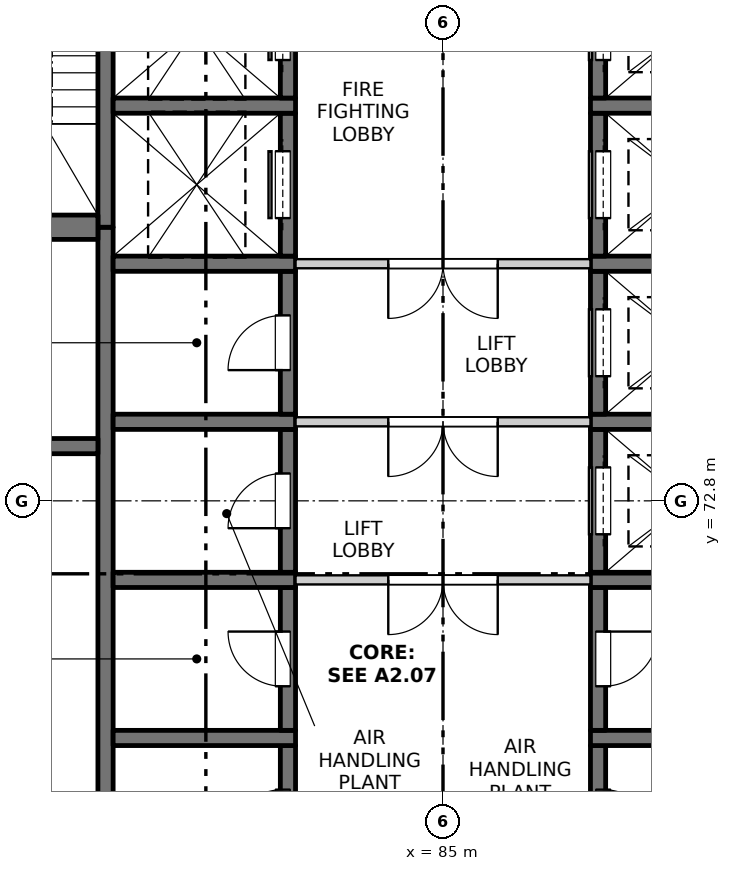
"""IFC4 building model, lengths in metres.
Left out: names, types, materials, properties, quantities, classifications, styles, units other than length and angle.
Written with IfcOpenShell. Run it as: python <this file> out.ifc"""

import sys

from ifc_helpers import new_model, si_unit, direction, frame, frame_2d, origin, place, context, subcontext, project, spatial, rectangle, extrude, element, fill, save


model = new_model("IFC4")
c1 = context("Model", 3, precision=1e-05, world=origin(), true_north=direction((0.0, 1.0)))
c2 = subcontext(c1, "Body", "Model", "MODEL_VIEW")
j1 = project(units=[si_unit("LENGTHUNIT", "METRE"), si_unit("PLANEANGLEUNIT", "RADIAN")], contexts=[c1])
p1 = place(None, origin())
s1 = spatial("IfcSite", under=j1, at=p1, CompositionType="ELEMENT")
p2 = place(p1, origin())
s2 = spatial("IfcBuilding", under=s1, at=p2, CompositionType="ELEMENT")
p3 = place(p2, frame((0.0, 0.0, 241.5)))
s3 = spatial("IfcBuildingStorey", under=s2, at=p3, CompositionType="ELEMENT", Elevation=241.5)
p4 = place(p3, frame((79.45, 60.975, -0.3), z_axis=(0.0, 0.0, 1.0), x_axis=(0.0, 1.0, 0.0)))
e1 = element("IfcWall", 1, at=p4, inside=s3, PredefinedType="SOLIDWALL", context=c2, shape_type="SweptSolid", body=[
    extrude(rectangle(XDim=16.325, YDim=0.25, at=frame_2d((8.163, 0.0))), origin(), (0.0, 0.0, 1.0), 4.5),
])
p5 = place(p3, frame((79.45, 77.3, -0.3), z_axis=(0.0, 0.0, 1.0), x_axis=(0.0, 1.0, 0.0)))
e2 = element("IfcWall", 2, at=p5, inside=s3, PredefinedType="SOLIDWALL", context=c2, shape_type="SweptSolid", body=[
    extrude(rectangle(XDim=7.0, YDim=0.25, at=frame_2d((3.5, 0.0))), origin(), (0.0, 0.0, 1.0), 4.5),
])
p6 = place(p3, frame((82.45, 66.425, -0.3), z_axis=(0.0, 0.0, 1.0), x_axis=(0.0, 1.0, 0.0)))
e3 = element("IfcWall", 3, at=p6, inside=s3, PredefinedType="SOLIDWALL", context=c2, shape_type="SweptSolid", body=[
    extrude(rectangle(XDim=2.35, YDim=0.25, at=frame_2d((1.175, 0.0))), origin(), (0.0, 0.0, 1.0), 4.5),
])
p7 = place(p6, frame((0.725, 0.0, 0.3)))
e4 = element("IfcOpeningElement", 4, at=p7, cuts=e3, PredefinedType="OPENING", context=c2, shape_type="SweptSolid", body=[
    extrude(rectangle(XDim=0.9, YDim=2.1, at=frame_2d((0.45, 1.05))), frame((0.0, 0.135, 0.0), z_axis=(0.0, -1.0, 0.0), x_axis=(1.0, 0.0, 0.0)), (0.0, 0.0, 1.0), 0.27),
])
p8 = place(p3, frame((79.575, 68.9, -0.3), z_axis=(0.0, 0.0, 1.0), x_axis=(1.0, 0.0, 0.0)))
e5 = element("IfcWall", 5, at=p8, inside=s3, PredefinedType="SOLIDWALL", context=c2, shape_type="SweptSolid", body=[
    extrude(rectangle(XDim=3.0, YDim=0.25, at=frame_2d((1.5, 0.0))), origin(), (0.0, 0.0, 1.0), 4.5),
])
p9 = place(p3, frame((82.45, 69.025, -0.3), z_axis=(0.0, 0.0, 1.0), x_axis=(0.0, 1.0, 0.0)))
e6 = element("IfcWall", 6, at=p9, inside=s3, PredefinedType="SOLIDWALL", context=c2, shape_type="SweptSolid", body=[
    extrude(rectangle(XDim=2.35, YDim=0.25, at=frame_2d((1.175, 0.0))), origin(), (0.0, 0.0, 1.0), 4.5),
])
p10 = place(p9, frame((0.725, 0.0, 0.3)))
e7 = element("IfcOpeningElement", 7, at=p10, cuts=e6, PredefinedType="OPENING", context=c2, shape_type="SweptSolid", body=[
    extrude(rectangle(XDim=0.9, YDim=2.1, at=frame_2d((0.45, 1.05))), frame((0.0, 0.135, 0.0), z_axis=(0.0, -1.0, 0.0), x_axis=(1.0, 0.0, 0.0)), (0.0, 0.0, 1.0), 0.27),
])
p11 = place(p3, frame((79.575, 71.5, -0.3), z_axis=(0.0, 0.0, 1.0), x_axis=(1.0, 0.0, 0.0)))
e8 = element("IfcWall", 8, at=p11, inside=s3, PredefinedType="SOLIDWALL", context=c2, shape_type="SweptSolid", body=[
    extrude(rectangle(XDim=3.0, YDim=0.25, at=frame_2d((1.5, 0.0))), origin(), (0.0, 0.0, 1.0), 4.5),
])
p12 = place(p3, frame((82.45, 71.625, -0.3), z_axis=(0.0, 0.0, 1.0), x_axis=(0.0, 1.0, 0.0)))
e9 = element("IfcWall", 9, at=p12, inside=s3, PredefinedType="SOLIDWALL", context=c2, shape_type="SweptSolid", body=[
    extrude(rectangle(XDim=2.35, YDim=0.25, at=frame_2d((1.175, 0.0))), origin(), (0.0, 0.0, 1.0), 4.5),
])
p13 = place(p12, frame((0.725, 0.0, 0.3)))
e10 = element("IfcOpeningElement", 10, at=p13, cuts=e9, PredefinedType="OPENING", context=c2, shape_type="SweptSolid", body=[
    extrude(rectangle(XDim=0.9, YDim=2.1, at=frame_2d((0.45, 1.05))), frame((0.0, 0.135, 0.0), z_axis=(0.0, -1.0, 0.0), x_axis=(1.0, 0.0, 0.0)), (0.0, 0.0, 1.0), 0.27),
])
p14 = place(p3, frame((79.575, 74.1, -0.3), z_axis=(0.0, 0.0, 1.0), x_axis=(1.0, 0.0, 0.0)))
e11 = element("IfcWall", 11, at=p14, inside=s3, PredefinedType="SOLIDWALL", context=c2, shape_type="SweptSolid", body=[
    extrude(rectangle(XDim=3.0, YDim=0.25, at=frame_2d((1.5, 0.0))), origin(), (0.0, 0.0, 1.0), 4.5),
])
p15 = place(p3, frame((82.45, 74.225, -0.3), z_axis=(0.0, 0.0, 1.0), x_axis=(0.0, 1.0, 0.0)))
e12 = element("IfcWall", 12, at=p15, inside=s3, PredefinedType="SOLIDWALL", context=c2, shape_type="SweptSolid", body=[
    extrude(rectangle(XDim=2.35, YDim=0.25, at=frame_2d((1.175, 0.0))), origin(), (0.0, 0.0, 1.0), 4.5),
])
p16 = place(p15, frame((0.725, 0.0, 0.3)))
e13 = element("IfcOpeningElement", 13, at=p16, cuts=e12, PredefinedType="OPENING", context=c2, shape_type="SweptSolid", body=[
    extrude(rectangle(XDim=0.9, YDim=2.1, at=frame_2d((0.45, 1.05))), frame((0.0, 0.135, 0.0), z_axis=(0.0, -1.0, 0.0), x_axis=(1.0, 0.0, 0.0)), (0.0, 0.0, 1.0), 0.27),
])
p17 = place(p3, frame((79.575, 76.7, -0.3), z_axis=(0.0, 0.0, 1.0), x_axis=(1.0, 0.0, 0.0)))
e14 = element("IfcWall", 14, at=p17, inside=s3, PredefinedType="SOLIDWALL", context=c2, shape_type="SweptSolid", body=[
    extrude(rectangle(XDim=3.0, YDim=0.25, at=frame_2d((1.5, 0.0))), origin(), (0.0, 0.0, 1.0), 4.5),
])
p18 = place(p3, frame((82.45, 76.825, -0.3), z_axis=(0.0, 0.0, 1.0), x_axis=(0.0, 1.0, 0.0)))
e15 = element("IfcWall", 15, at=p18, inside=s3, PredefinedType="SOLIDWALL", context=c2, shape_type="SweptSolid", body=[
    extrude(rectangle(XDim=2.35, YDim=0.25, at=frame_2d((1.175, 0.0))), origin(), (0.0, 0.0, 1.0), 4.5),
])
p19 = place(p18, frame((0.625, 0.0, 0.3)))
e16 = element("IfcOpeningElement", 16, at=p19, cuts=e15, PredefinedType="OPENING", context=c2, shape_type="SweptSolid", body=[
    extrude(rectangle(XDim=1.1, YDim=2.1, at=frame_2d((0.55, 1.05))), frame((0.0, 0.135, 0.0), z_axis=(0.0, -1.0, 0.0), x_axis=(1.0, 0.0, 0.0)), (0.0, 0.0, 1.0), 0.27),
])
p20 = place(p3, frame((79.575, 79.3, -0.3), z_axis=(0.0, 0.0, 1.0), x_axis=(1.0, 0.0, 0.0)))
e17 = element("IfcWall", 17, at=p20, inside=s3, PredefinedType="SOLIDWALL", context=c2, shape_type="SweptSolid", body=[
    extrude(rectangle(XDim=3.0, YDim=0.25, at=frame_2d((1.5, 0.0))), origin(), (0.0, 0.0, 1.0), 4.5),
])
p21 = place(p3, frame((82.45, 79.425, -0.3), z_axis=(0.0, 0.0, 1.0), x_axis=(0.0, 1.0, 0.0)))
e18 = element("IfcWall", 18, at=p21, inside=s3, PredefinedType="SOLIDWALL", context=c2, shape_type="SweptSolid", body=[
    extrude(rectangle(XDim=2.35, YDim=0.25, at=frame_2d((1.175, 0.0))), origin(), (0.0, 0.0, 1.0), 4.5),
])
p22 = place(p21, frame((0.625, 0.0, 0.3)))
e19 = element("IfcOpeningElement", 19, at=p22, cuts=e18, PredefinedType="OPENING", context=c2, shape_type="SweptSolid", body=[
    extrude(rectangle(XDim=1.1, YDim=2.1, at=frame_2d((0.55, 1.05))), frame((0.0, 0.135, 0.0), z_axis=(0.0, -1.0, 0.0), x_axis=(1.0, 0.0, 0.0)), (0.0, 0.0, 1.0), 0.27),
])
p23 = place(p3, frame((87.55, 66.425, -0.3), z_axis=(0.0, 0.0, 1.0), x_axis=(0.0, 1.0, 0.0)))
e20 = element("IfcWall", 20, at=p23, inside=s3, PredefinedType="SOLIDWALL", context=c2, shape_type="SweptSolid", body=[
    extrude(rectangle(XDim=2.35, YDim=0.25, at=frame_2d((1.175, 0.0))), origin(), (0.0, 0.0, 1.0), 4.5),
])
p24 = place(p23, frame((0.725, 0.0, 0.3)))
e21 = element("IfcOpeningElement", 21, at=p24, cuts=e20, PredefinedType="OPENING", context=c2, shape_type="SweptSolid", body=[
    extrude(rectangle(XDim=0.9, YDim=2.1, at=frame_2d((0.45, 1.05))), frame((0.0, 0.135, 0.0), z_axis=(0.0, -1.0, 0.0), x_axis=(1.0, 0.0, 0.0)), (0.0, 0.0, 1.0), 0.27),
])
p25 = place(p3, frame((87.425, 68.9, -0.3), z_axis=(0.0, 0.0, 1.0), x_axis=(1.0, 0.0, 0.0)))
e22 = element("IfcWall", 22, at=p25, inside=s3, PredefinedType="SOLIDWALL", context=c2, shape_type="SweptSolid", body=[
    extrude(rectangle(XDim=3.0, YDim=0.25, at=frame_2d((1.5, 0.0))), origin(), (0.0, 0.0, 1.0), 4.5),
])
p26 = place(p3, frame((87.55, 69.025, -0.3), z_axis=(0.0, 0.0, 1.0), x_axis=(0.0, 1.0, 0.0)))
e23 = element("IfcWall", 23, at=p26, inside=s3, PredefinedType="SOLIDWALL", context=c2, shape_type="SweptSolid", body=[
    extrude(rectangle(XDim=2.35, YDim=0.25, at=frame_2d((1.175, 0.0))), origin(), (0.0, 0.0, 1.0), 4.5),
])
p27 = place(p26, frame((0.725, 0.0, 0.3)))
e24 = element("IfcOpeningElement", 24, at=p27, cuts=e23, PredefinedType="OPENING", context=c2, shape_type="SweptSolid", body=[
    extrude(rectangle(XDim=0.9, YDim=2.1, at=frame_2d((0.45, 1.05))), frame((0.0, 0.135, 0.0), z_axis=(0.0, -1.0, 0.0), x_axis=(1.0, 0.0, 0.0)), (0.0, 0.0, 1.0), 0.27),
])
p28 = place(p3, frame((87.425, 71.5, -0.3), z_axis=(0.0, 0.0, 1.0), x_axis=(1.0, 0.0, 0.0)))
e25 = element("IfcWall", 25, at=p28, inside=s3, PredefinedType="SOLIDWALL", context=c2, shape_type="SweptSolid", body=[
    extrude(rectangle(XDim=3.0, YDim=0.25, at=frame_2d((1.5, 0.0))), origin(), (0.0, 0.0, 1.0), 4.5),
])
p29 = place(p3, frame((87.55, 71.625, -0.3), z_axis=(0.0, 0.0, 1.0), x_axis=(0.0, 1.0, 0.0)))
e26 = element("IfcWall", 26, at=p29, inside=s3, PredefinedType="SOLIDWALL", context=c2, shape_type="SweptSolid", body=[
    extrude(rectangle(XDim=2.35, YDim=0.25, at=frame_2d((1.175, 0.0))), origin(), (0.0, 0.0, 1.0), 4.5),
])
p30 = place(p29, frame((0.625, 0.0, 0.3)))
e27 = element("IfcOpeningElement", 27, at=p30, cuts=e26, PredefinedType="OPENING", context=c2, shape_type="SweptSolid", body=[
    extrude(rectangle(XDim=1.1, YDim=2.1, at=frame_2d((0.55, 1.05))), frame((0.0, 0.135, 0.0), z_axis=(0.0, -1.0, 0.0), x_axis=(1.0, 0.0, 0.0)), (0.0, 0.0, 1.0), 0.27),
])
p31 = place(p3, frame((87.425, 74.1, -0.3), z_axis=(0.0, 0.0, 1.0), x_axis=(1.0, 0.0, 0.0)))
e28 = element("IfcWall", 28, at=p31, inside=s3, PredefinedType="SOLIDWALL", context=c2, shape_type="SweptSolid", body=[
    extrude(rectangle(XDim=3.0, YDim=0.25, at=frame_2d((1.5, 0.0))), origin(), (0.0, 0.0, 1.0), 4.5),
])
p32 = place(p3, frame((87.55, 74.225, -0.3), z_axis=(0.0, 0.0, 1.0), x_axis=(0.0, 1.0, 0.0)))
e29 = element("IfcWall", 29, at=p32, inside=s3, PredefinedType="SOLIDWALL", context=c2, shape_type="SweptSolid", body=[
    extrude(rectangle(XDim=2.35, YDim=0.25, at=frame_2d((1.175, 0.0))), origin(), (0.0, 0.0, 1.0), 4.5),
])
p33 = place(p32, frame((0.625, 0.0, 0.3)))
e30 = element("IfcOpeningElement", 30, at=p33, cuts=e29, PredefinedType="OPENING", context=c2, shape_type="SweptSolid", body=[
    extrude(rectangle(XDim=1.1, YDim=2.1, at=frame_2d((0.55, 1.05))), frame((0.0, 0.135, 0.0), z_axis=(0.0, -1.0, 0.0), x_axis=(1.0, 0.0, 0.0)), (0.0, 0.0, 1.0), 0.27),
])
p34 = place(p3, frame((87.425, 76.7, -0.3), z_axis=(0.0, 0.0, 1.0), x_axis=(1.0, 0.0, 0.0)))
e31 = element("IfcWall", 31, at=p34, inside=s3, PredefinedType="SOLIDWALL", context=c2, shape_type="SweptSolid", body=[
    extrude(rectangle(XDim=3.0, YDim=0.25, at=frame_2d((1.5, 0.0))), origin(), (0.0, 0.0, 1.0), 4.5),
])
p35 = place(p3, frame((87.55, 76.825, -0.3), z_axis=(0.0, 0.0, 1.0), x_axis=(0.0, 1.0, 0.0)))
e32 = element("IfcWall", 32, at=p35, inside=s3, PredefinedType="SOLIDWALL", context=c2, shape_type="SweptSolid", body=[
    extrude(rectangle(XDim=2.35, YDim=0.25, at=frame_2d((1.175, 0.0))), origin(), (0.0, 0.0, 1.0), 4.5),
])
p36 = place(p35, frame((0.625, 0.0, 0.3)))
e33 = element("IfcOpeningElement", 33, at=p36, cuts=e32, PredefinedType="OPENING", context=c2, shape_type="SweptSolid", body=[
    extrude(rectangle(XDim=1.1, YDim=2.1, at=frame_2d((0.55, 1.05))), frame((0.0, 0.135, 0.0), z_axis=(0.0, -1.0, 0.0), x_axis=(1.0, 0.0, 0.0)), (0.0, 0.0, 1.0), 0.27),
])
p37 = place(p3, frame((87.425, 79.3, -0.3), z_axis=(0.0, 0.0, 1.0), x_axis=(1.0, 0.0, 0.0)))
e34 = element("IfcWall", 34, at=p37, inside=s3, PredefinedType="SOLIDWALL", context=c2, shape_type="SweptSolid", body=[
    extrude(rectangle(XDim=3.0, YDim=0.25, at=frame_2d((1.5, 0.0))), origin(), (0.0, 0.0, 1.0), 4.5),
])
p38 = place(p3, frame((87.55, 79.425, -0.3), z_axis=(0.0, 0.0, 1.0), x_axis=(0.0, 1.0, 0.0)))
e35 = element("IfcWall", 35, at=p38, inside=s3, PredefinedType="SOLIDWALL", context=c2, shape_type="SweptSolid", body=[
    extrude(rectangle(XDim=2.35, YDim=0.25, at=frame_2d((1.175, 0.0))), origin(), (0.0, 0.0, 1.0), 4.5),
])
p39 = place(p38, frame((0.625, 0.0, 0.3)))
e36 = element("IfcOpeningElement", 36, at=p39, cuts=e35, PredefinedType="OPENING", context=c2, shape_type="SweptSolid", body=[
    extrude(rectangle(XDim=1.1, YDim=2.1, at=frame_2d((0.55, 1.05))), frame((0.0, 0.135, 0.0), z_axis=(0.0, -1.0, 0.0), x_axis=(1.0, 0.0, 0.0)), (0.0, 0.0, 1.0), 0.27),
])
p40 = place(p3, frame((75.45, 73.7, -0.3), z_axis=(0.0, 0.0, 1.0), x_axis=(1.0, 0.0, 0.0)))
e37 = element("IfcWall", 37, at=p40, inside=s3, PredefinedType="SOLIDWALL", context=c2, shape_type="SweptSolid", body=[
    extrude(rectangle(XDim=3.875, YDim=0.25, at=frame_2d((1.938, 0.0))), origin(), (0.0, 0.0, 1.0), 4.5),
])
p41 = place(p3, frame((75.45, 77.3, -0.3), z_axis=(0.0, 0.0, 1.0), x_axis=(1.0, 0.0, 0.0)))
e38 = element("IfcWall", 38, at=p41, inside=s3, PredefinedType="SOLIDWALL", context=c2, shape_type="SweptSolid", body=[
    extrude(rectangle(XDim=3.875, YDim=0.4, at=frame_2d((1.938, 0.0))), origin(), (0.0, 0.0, 1.0), 4.5),
])
p42 = place(p3, frame((82.575, 71.5, 0.0), z_axis=(0.0, 0.0, 1.0), x_axis=(1.0, 0.0, 0.0)))
e39 = element("IfcWall", 39, at=p42, inside=s3, PredefinedType="PARTITIONING", context=c2, shape_type="SweptSolid", body=[
    extrude(rectangle(XDim=4.85, YDim=0.15, at=frame_2d((2.425, 0.0))), origin(), (0.0, 0.0, 1.0), 4.2),
])
p43 = place(p42, frame((1.525, 0.0, 0.0)))
e40 = element("IfcOpeningElement", 40, at=p43, cuts=e39, PredefinedType="OPENING", context=c2, shape_type="SweptSolid", body=[
    extrude(rectangle(XDim=1.8, YDim=2.1, at=frame_2d((0.9, 1.05))), frame((0.0, 0.085, 0.0), z_axis=(0.0, -1.0, 0.0), x_axis=(1.0, 0.0, 0.0)), (0.0, 0.0, 1.0), 0.17),
])
p44 = place(p3, frame((82.575, 74.1, 0.0), z_axis=(0.0, 0.0, 1.0), x_axis=(1.0, 0.0, 0.0)))
e41 = element("IfcWall", 41, at=p44, inside=s3, PredefinedType="PARTITIONING", context=c2, shape_type="SweptSolid", body=[
    extrude(rectangle(XDim=4.85, YDim=0.15, at=frame_2d((2.425, 0.0))), origin(), (0.0, 0.0, 1.0), 4.2),
])
p45 = place(p44, frame((1.525, 0.0, 0.0)))
e42 = element("IfcOpeningElement", 42, at=p45, cuts=e41, PredefinedType="OPENING", context=c2, shape_type="SweptSolid", body=[
    extrude(rectangle(XDim=1.8, YDim=2.1, at=frame_2d((0.9, 1.05))), frame((0.0, 0.085, 0.0), z_axis=(0.0, -1.0, 0.0), x_axis=(1.0, 0.0, 0.0)), (0.0, 0.0, 1.0), 0.17),
])
p46 = place(p3, frame((82.575, 76.7, 0.0), z_axis=(0.0, 0.0, 1.0), x_axis=(1.0, 0.0, 0.0)))
e43 = element("IfcWall", 43, at=p46, inside=s3, PredefinedType="PARTITIONING", context=c2, shape_type="SweptSolid", body=[
    extrude(rectangle(XDim=4.85, YDim=0.15, at=frame_2d((2.425, 0.0))), origin(), (0.0, 0.0, 1.0), 4.2),
])
p47 = place(p46, frame((1.525, 0.0, 0.0)))
e44 = element("IfcOpeningElement", 44, at=p47, cuts=e43, PredefinedType="OPENING", context=c2, shape_type="SweptSolid", body=[
    extrude(rectangle(XDim=1.8, YDim=2.1, at=frame_2d((0.9, 1.05))), frame((0.0, 0.085, 0.0), z_axis=(0.0, -1.0, 0.0), x_axis=(1.0, 0.0, 0.0)), (0.0, 0.0, 1.0), 0.17),
])
p48 = place(p7, origin())
e45 = element("IfcDoor", 45, at=p48, inside=s3, OperationType="SINGLE_SWING_LEFT", PredefinedType="DOOR", context=c2, shape_type="SweptSolid", body=[
    extrude(rectangle(XDim=0.9, YDim=2.1, at=frame_2d((0.45, 1.05))), frame((0.0, 0.11, 0.0), z_axis=(0.0, -1.0, 0.0), x_axis=(1.0, 0.0, 0.0)), (0.0, 0.0, 1.0), 0.05),
])
fill(e4, e45)
p49 = place(p24, origin())
e46 = element("IfcDoor", 46, at=p49, inside=s3, OperationType="SINGLE_SWING_RIGHT", PredefinedType="DOOR", context=c2, shape_type="SweptSolid", body=[
    extrude(rectangle(XDim=0.9, YDim=2.1, at=frame_2d((0.45, 1.05))), frame((0.0, -0.06, 0.0), z_axis=(0.0, -1.0, 0.0), x_axis=(1.0, 0.0, 0.0)), (0.0, 0.0, 1.0), 0.05),
])
fill(e21, e46)
p50 = place(p10, origin())
e47 = element("IfcDoor", 47, at=p50, inside=s3, OperationType="SINGLE_SWING_RIGHT", PredefinedType="DOOR", context=c2, shape_type="SweptSolid", body=[
    extrude(rectangle(XDim=0.9, YDim=2.1, at=frame_2d((0.45, 1.05))), frame((0.0, 0.11, 0.0), z_axis=(0.0, -1.0, 0.0), x_axis=(1.0, 0.0, 0.0)), (0.0, 0.0, 1.0), 0.05),
])
fill(e7, e47)
p51 = place(p27, origin())
e48 = element("IfcDoor", 48, at=p51, inside=s3, OperationType="SINGLE_SWING_LEFT", PredefinedType="DOOR", context=c2, shape_type="SweptSolid", body=[
    extrude(rectangle(XDim=0.9, YDim=2.1, at=frame_2d((0.45, 1.05))), frame((0.0, -0.06, 0.0), z_axis=(0.0, -1.0, 0.0), x_axis=(1.0, 0.0, 0.0)), (0.0, 0.0, 1.0), 0.05),
])
fill(e24, e48)
p52 = place(p43, origin())
e49 = element("IfcDoor", 49, at=p52, inside=s3, OperationType="DOUBLE_DOOR_SINGLE_SWING", PredefinedType="DOOR", context=c2, shape_type="SweptSolid", body=[
    extrude(rectangle(XDim=1.8, YDim=2.1, at=frame_2d((0.9, 1.05))), frame((0.0, 0.025, 0.0), z_axis=(0.0, -1.0, 0.0), x_axis=(1.0, 0.0, 0.0)), (0.0, 0.0, 1.0), 0.05),
])
fill(e40, e49)
p53 = place(p13, origin())
e50 = element("IfcDoor", 50, at=p53, inside=s3, OperationType="SINGLE_SWING_LEFT", PredefinedType="DOOR", context=c2, shape_type="SweptSolid", body=[
    extrude(rectangle(XDim=0.9, YDim=2.1, at=frame_2d((0.45, 1.05))), frame((0.0, 0.11, 0.0), z_axis=(0.0, -1.0, 0.0), x_axis=(1.0, 0.0, 0.0)), (0.0, 0.0, 1.0), 0.05),
])
fill(e10, e50)
p54 = place(p30, origin())
e51 = element("IfcDoor", 51, at=p54, inside=s3, OperationType="SLIDING_TO_LEFT", PredefinedType="DOOR", context=c2, shape_type="SweptSolid", body=[
    extrude(rectangle(XDim=1.1, YDim=2.1, at=frame_2d((0.55, 1.05))), frame((0.0, -0.06, 0.0), z_axis=(0.0, -1.0, 0.0), x_axis=(1.0, 0.0, 0.0)), (0.0, 0.0, 1.0), 0.05),
])
fill(e27, e51)
p55 = place(p45, origin())
e52 = element("IfcDoor", 52, at=p55, inside=s3, OperationType="DOUBLE_DOOR_SINGLE_SWING", PredefinedType="DOOR", context=c2, shape_type="SweptSolid", body=[
    extrude(rectangle(XDim=1.8, YDim=2.1, at=frame_2d((0.9, 1.05))), frame((0.0, 0.025, 0.0), z_axis=(0.0, -1.0, 0.0), x_axis=(1.0, 0.0, 0.0)), (0.0, 0.0, 1.0), 0.05),
])
fill(e42, e52)
p56 = place(p16, origin())
e53 = element("IfcDoor", 53, at=p56, inside=s3, OperationType="SINGLE_SWING_LEFT", PredefinedType="DOOR", context=c2, shape_type="SweptSolid", body=[
    extrude(rectangle(XDim=0.9, YDim=2.1, at=frame_2d((0.45, 1.05))), frame((0.0, 0.11, 0.0), z_axis=(0.0, -1.0, 0.0), x_axis=(1.0, 0.0, 0.0)), (0.0, 0.0, 1.0), 0.05),
])
fill(e13, e53)
p57 = place(p33, origin())
e54 = element("IfcDoor", 54, at=p57, inside=s3, OperationType="SLIDING_TO_LEFT", PredefinedType="DOOR", context=c2, shape_type="SweptSolid", body=[
    extrude(rectangle(XDim=1.1, YDim=2.1, at=frame_2d((0.55, 1.05))), frame((0.0, -0.06, 0.0), z_axis=(0.0, -1.0, 0.0), x_axis=(1.0, 0.0, 0.0)), (0.0, 0.0, 1.0), 0.05),
])
fill(e30, e54)
p58 = place(p47, origin())
e55 = element("IfcDoor", 55, at=p58, inside=s3, OperationType="DOUBLE_DOOR_SINGLE_SWING", PredefinedType="DOOR", context=c2, shape_type="SweptSolid", body=[
    extrude(rectangle(XDim=1.8, YDim=2.1, at=frame_2d((0.9, 1.05))), frame((0.0, 0.025, 0.0), z_axis=(0.0, -1.0, 0.0), x_axis=(1.0, 0.0, 0.0)), (0.0, 0.0, 1.0), 0.05),
])
fill(e44, e55)
p59 = place(p19, origin())
e56 = element("IfcDoor", 56, at=p59, inside=s3, OperationType="SLIDING_TO_LEFT", PredefinedType="DOOR", context=c2, shape_type="SweptSolid", body=[
    extrude(rectangle(XDim=1.1, YDim=2.1, at=frame_2d((0.55, 1.05))), frame((0.0, 0.11, 0.0), z_axis=(0.0, -1.0, 0.0), x_axis=(1.0, 0.0, 0.0)), (0.0, 0.0, 1.0), 0.05),
])
fill(e16, e56)
p60 = place(p36, origin())
e57 = element("IfcDoor", 57, at=p60, inside=s3, OperationType="SLIDING_TO_LEFT", PredefinedType="DOOR", context=c2, shape_type="SweptSolid", body=[
    extrude(rectangle(XDim=1.1, YDim=2.1, at=frame_2d((0.55, 1.05))), frame((0.0, -0.06, 0.0), z_axis=(0.0, -1.0, 0.0), x_axis=(1.0, 0.0, 0.0)), (0.0, 0.0, 1.0), 0.05),
])
fill(e33, e57)
p61 = place(p22, origin())
e58 = element("IfcDoor", 58, at=p61, inside=s3, OperationType="SLIDING_TO_LEFT", PredefinedType="DOOR", context=c2, shape_type="SweptSolid", body=[
    extrude(rectangle(XDim=1.1, YDim=2.1, at=frame_2d((0.55, 1.05))), frame((0.0, 0.11, 0.0), z_axis=(0.0, -1.0, 0.0), x_axis=(1.0, 0.0, 0.0)), (0.0, 0.0, 1.0), 0.05),
])
fill(e19, e58)
p62 = place(p39, origin())
e59 = element("IfcDoor", 59, at=p62, inside=s3, OperationType="SLIDING_TO_RIGHT", PredefinedType="DOOR", context=c2, shape_type="SweptSolid", body=[
    extrude(rectangle(XDim=1.1, YDim=2.1, at=frame_2d((0.55, 1.05))), frame((0.0, -0.06, 0.0), z_axis=(0.0, -1.0, 0.0), x_axis=(1.0, 0.0, 0.0)), (0.0, 0.0, 1.0), 0.05),
])
fill(e36, e59)
save(model, sys.argv[1])
